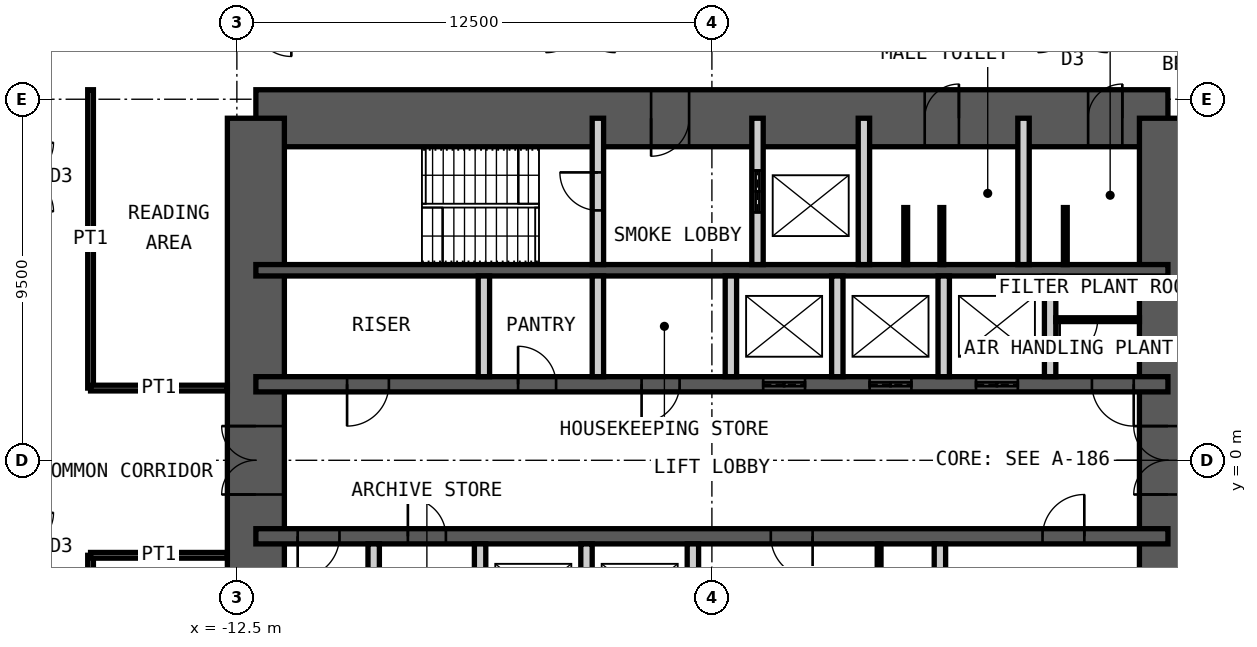
"""IFC4 building model, lengths in metres.
Left out: names, types, materials, properties, quantities, classifications, styles, units other than length and angle.
Written with IfcOpenShell. Run it as: python <this file> out.ifc"""

import sys

from ifc_helpers import new_model, si_unit, direction, frame, frame_2d, origin, place, context, subcontext, project, spatial, rectangle, extrude, element, fill, save


model = new_model("IFC4")
c1 = context("Model", 3, precision=1e-05, world=origin(), true_north=direction((0.0, 1.0)))
c2 = subcontext(c1, "Body", "Model", "MODEL_VIEW")
j1 = project(units=[si_unit("LENGTHUNIT", "METRE"), si_unit("PLANEANGLEUNIT", "RADIAN")], contexts=[c1])
p1 = place(None, origin())
s1 = spatial("IfcSite", under=j1, at=p1, CompositionType="ELEMENT")
p2 = place(p1, origin())
s2 = spatial("IfcBuilding", under=s1, at=p2, CompositionType="ELEMENT")
p3 = place(p2, frame((0.0, 0.0, 128.2)))
s3 = spatial("IfcBuildingStorey", under=s2, at=p3, CompositionType="ELEMENT", Elevation=128.2)
p4 = place(p3, frame((-12.0, 9.0, 0.0), z_axis=(0.0, 0.0, 1.0), x_axis=(1.0, 0.0, 0.0)))
e1 = element("IfcWall", 1, at=p4, inside=s3, PredefinedType="SHEAR", context=c2, shape_type="SweptSolid", body=[
    extrude(rectangle(XDim=24.0, YDim=1.5, at=frame_2d((12.0, 0.0))), origin(), (0.0, 0.0, 1.0), 4.2),
])
p5 = place(p4, frame((10.4, 0.0, 0.0)))
e2 = element("IfcOpeningElement", 2, at=p5, cuts=e1, PredefinedType="OPENING", context=c2, shape_type="SweptSolid", body=[
    extrude(rectangle(XDim=1.0, YDim=2.1, at=frame_2d((0.5, 1.05))), frame((0.0, 0.76, 0.0), z_axis=(0.0, -1.0, 0.0), x_axis=(1.0, 0.0, 0.0)), (0.0, 0.0, 1.0), 1.52),
])
p6 = place(p4, frame((17.6, 0.0, 0.0)))
e3 = element("IfcOpeningElement", 3, at=p6, cuts=e1, PredefinedType="OPENING", context=c2, shape_type="SweptSolid", body=[
    extrude(rectangle(XDim=0.9, YDim=2.1, at=frame_2d((0.45, 1.05))), frame((0.0, 0.76, 0.0), z_axis=(0.0, -1.0, 0.0), x_axis=(1.0, 0.0, 0.0)), (0.0, 0.0, 1.0), 1.52),
])
p7 = place(p4, frame((21.9, 0.0, 0.0)))
e4 = element("IfcOpeningElement", 4, at=p7, cuts=e1, PredefinedType="OPENING", context=c2, shape_type="SweptSolid", body=[
    extrude(rectangle(XDim=0.9, YDim=2.1, at=frame_2d((0.45, 1.05))), frame((0.0, 0.76, 0.0), z_axis=(0.0, -1.0, 0.0), x_axis=(1.0, 0.0, 0.0)), (0.0, 0.0, 1.0), 1.52),
])
p8 = place(p3, frame((12.0, -9.0, 0.0), z_axis=(0.0, 0.0, 1.0), x_axis=(0.0, 1.0, 0.0)))
e5 = element("IfcWall", 5, at=p8, inside=s3, PredefinedType="SHEAR", context=c2, shape_type="SweptSolid", body=[
    extrude(rectangle(XDim=18.0, YDim=1.5, at=frame_2d((9.0, 0.0))), origin(), (0.0, 0.0, 1.0), 4.2),
])
p9 = place(p8, frame((8.1, 0.0, 0.0)))
e6 = element("IfcOpeningElement", 6, at=p9, cuts=e5, PredefinedType="OPENING", context=c2, shape_type="SweptSolid", body=[
    extrude(rectangle(XDim=1.8, YDim=2.1, at=frame_2d((0.9, 1.05))), frame((0.0, 0.76, 0.0), z_axis=(0.0, -1.0, 0.0), x_axis=(1.0, 0.0, 0.0)), (0.0, 0.0, 1.0), 1.52),
])
p10 = place(p3, frame((-12.0, -9.0, 0.0), z_axis=(0.0, 0.0, 1.0), x_axis=(0.0, 1.0, 0.0)))
e7 = element("IfcWall", 7, at=p10, inside=s3, PredefinedType="SHEAR", context=c2, shape_type="SweptSolid", body=[
    extrude(rectangle(XDim=18.0, YDim=1.5, at=frame_2d((9.0, 0.0))), origin(), (0.0, 0.0, 1.0), 4.2),
])
p11 = place(p10, frame((8.1, 0.0, 0.0)))
e8 = element("IfcOpeningElement", 8, at=p11, cuts=e7, PredefinedType="OPENING", context=c2, shape_type="SweptSolid", body=[
    extrude(rectangle(XDim=1.8, YDim=2.1, at=frame_2d((0.9, 1.05))), frame((0.0, 0.76, 0.0), z_axis=(0.0, -1.0, 0.0), x_axis=(1.0, 0.0, 0.0)), (0.0, 0.0, 1.0), 1.52),
])
p12 = place(p3, frame((-12.0, 5.0, 0.0), z_axis=(0.0, 0.0, 1.0), x_axis=(1.0, 0.0, 0.0)))
e9 = element("IfcWall", 9, at=p12, inside=s3, PredefinedType="SHEAR", context=c2, shape_type="SweptSolid", body=[
    extrude(rectangle(XDim=24.0, YDim=0.3, at=frame_2d((12.0, 0.0))), origin(), (0.0, 0.0, 1.0), 4.2),
])
p13 = place(p3, frame((-12.0, 2.0, 0.0), z_axis=(0.0, 0.0, 1.0), x_axis=(1.0, 0.0, 0.0)))
e10 = element("IfcWall", 10, at=p13, inside=s3, PredefinedType="SHEAR", context=c2, shape_type="SweptSolid", body=[
    extrude(rectangle(XDim=24.0, YDim=0.4, at=frame_2d((12.0, 0.0))), origin(), (0.0, 0.0, 1.0), 4.2),
])
p14 = place(p13, frame((2.4, 0.0, 0.0)))
e11 = element("IfcOpeningElement", 11, at=p14, cuts=e10, PredefinedType="OPENING", context=c2, shape_type="SweptSolid", body=[
    extrude(rectangle(XDim=1.1, YDim=2.1, at=frame_2d((0.55, 1.05))), frame((0.0, 0.21, 0.0), z_axis=(0.0, -1.0, 0.0), x_axis=(1.0, 0.0, 0.0)), (0.0, 0.0, 1.0), 0.42),
])
p15 = place(p13, frame((22.0, 0.0, 0.0)))
e12 = element("IfcOpeningElement", 12, at=p15, cuts=e10, PredefinedType="OPENING", context=c2, shape_type="SweptSolid", body=[
    extrude(rectangle(XDim=1.1, YDim=2.1, at=frame_2d((0.55, 1.05))), frame((0.0, 0.21, 0.0), z_axis=(0.0, -1.0, 0.0), x_axis=(1.0, 0.0, 0.0)), (0.0, 0.0, 1.0), 0.42),
])
p16 = place(p13, frame((10.15, 0.0, 0.0)))
e13 = element("IfcOpeningElement", 13, at=p16, cuts=e10, PredefinedType="OPENING", context=c2, shape_type="SweptSolid", body=[
    extrude(rectangle(XDim=1.0, YDim=2.1, at=frame_2d((0.5, 1.05))), frame((0.0, 0.21, 0.0), z_axis=(0.0, -1.0, 0.0), x_axis=(1.0, 0.0, 0.0)), (0.0, 0.0, 1.0), 0.42),
])
p17 = place(p13, frame((6.9, 0.0, 0.0)))
e14 = element("IfcOpeningElement", 14, at=p17, cuts=e10, PredefinedType="OPENING", context=c2, shape_type="SweptSolid", body=[
    extrude(rectangle(XDim=1.0, YDim=2.1, at=frame_2d((0.5, 1.05))), frame((0.0, 0.21, 0.0), z_axis=(0.0, -1.0, 0.0), x_axis=(1.0, 0.0, 0.0)), (0.0, 0.0, 1.0), 0.42),
])
p18 = place(p13, frame((13.35, 0.0, 0.0)))
e15 = element("IfcOpeningElement", 15, at=p18, cuts=e10, PredefinedType="OPENING", context=c2, shape_type="SweptSolid", body=[
    extrude(rectangle(XDim=1.1, YDim=2.4, at=frame_2d((0.55, 1.2))), frame((0.0, 0.21, 0.0), z_axis=(0.0, -1.0, 0.0), x_axis=(1.0, 0.0, 0.0)), (0.0, 0.0, 1.0), 0.42),
])
p19 = place(p13, frame((16.15, 0.0, 0.0)))
e16 = element("IfcOpeningElement", 16, at=p19, cuts=e10, PredefinedType="OPENING", context=c2, shape_type="SweptSolid", body=[
    extrude(rectangle(XDim=1.1, YDim=2.4, at=frame_2d((0.55, 1.2))), frame((0.0, 0.21, 0.0), z_axis=(0.0, -1.0, 0.0), x_axis=(1.0, 0.0, 0.0)), (0.0, 0.0, 1.0), 0.42),
])
p20 = place(p13, frame((18.95, 0.0, 0.0)))
e17 = element("IfcOpeningElement", 17, at=p20, cuts=e10, PredefinedType="OPENING", context=c2, shape_type="SweptSolid", body=[
    extrude(rectangle(XDim=1.1, YDim=2.4, at=frame_2d((0.55, 1.2))), frame((0.0, 0.21, 0.0), z_axis=(0.0, -1.0, 0.0), x_axis=(1.0, 0.0, 0.0)), (0.0, 0.0, 1.0), 0.42),
])
p21 = place(p3, frame((-12.0, -2.0, 0.0), z_axis=(0.0, 0.0, 1.0), x_axis=(1.0, 0.0, 0.0)))
e18 = element("IfcWall", 18, at=p21, inside=s3, PredefinedType="SHEAR", context=c2, shape_type="SweptSolid", body=[
    extrude(rectangle(XDim=24.0, YDim=0.4, at=frame_2d((12.0, 0.0))), origin(), (0.0, 0.0, 1.0), 4.2),
])
p22 = place(p21, frame((1.1, 0.0, 0.0)))
e19 = element("IfcOpeningElement", 19, at=p22, cuts=e18, PredefinedType="OPENING", context=c2, shape_type="SweptSolid", body=[
    extrude(rectangle(XDim=1.1, YDim=2.1, at=frame_2d((0.55, 1.05))), frame((0.0, 0.21, 0.0), z_axis=(0.0, -1.0, 0.0), x_axis=(1.0, 0.0, 0.0)), (0.0, 0.0, 1.0), 0.42),
])
p23 = place(p21, frame((13.55, 0.0, 0.0)))
e20 = element("IfcOpeningElement", 20, at=p23, cuts=e18, PredefinedType="OPENING", context=c2, shape_type="SweptSolid", body=[
    extrude(rectangle(XDim=1.1, YDim=2.1, at=frame_2d((0.55, 1.05))), frame((0.0, 0.21, 0.0), z_axis=(0.0, -1.0, 0.0), x_axis=(1.0, 0.0, 0.0)), (0.0, 0.0, 1.0), 0.42),
])
p24 = place(p21, frame((20.7, 0.0, 0.0)))
e21 = element("IfcOpeningElement", 21, at=p24, cuts=e18, PredefinedType="OPENING", context=c2, shape_type="SweptSolid", body=[
    extrude(rectangle(XDim=1.1, YDim=2.1, at=frame_2d((0.55, 1.05))), frame((0.0, 0.21, 0.0), z_axis=(0.0, -1.0, 0.0), x_axis=(1.0, 0.0, 0.0)), (0.0, 0.0, 1.0), 0.42),
])
p25 = place(p21, frame((4.0, 0.0, 0.0)))
e22 = element("IfcOpeningElement", 22, at=p25, cuts=e18, PredefinedType="OPENING", context=c2, shape_type="SweptSolid", body=[
    extrude(rectangle(XDim=1.0, YDim=2.1, at=frame_2d((0.5, 1.05))), frame((0.0, 0.21, 0.0), z_axis=(0.0, -1.0, 0.0), x_axis=(1.0, 0.0, 0.0)), (0.0, 0.0, 1.0), 0.42),
])
p26 = place(p3, frame((-3.0, 5.15, 0.0), z_axis=(0.0, 0.0, 1.0), x_axis=(0.0, 1.0, 0.0)))
e23 = element("IfcWall", 23, at=p26, inside=s3, PredefinedType="PARTITIONING", context=c2, shape_type="SweptSolid", body=[
    extrude(rectangle(XDim=3.85, YDim=0.3, at=frame_2d((1.925, 0.0))), origin(), (0.0, 0.0, 1.0), 3.98),
])
p27 = place(p26, frame((1.425, 0.0, 0.0)))
e24 = element("IfcOpeningElement", 24, at=p27, cuts=e23, PredefinedType="OPENING", context=c2, shape_type="SweptSolid", body=[
    extrude(rectangle(XDim=1.0, YDim=2.1, at=frame_2d((0.5, 1.05))), frame((0.0, 0.16, 0.0), z_axis=(0.0, -1.0, 0.0), x_axis=(1.0, 0.0, 0.0)), (0.0, 0.0, 1.0), 0.32),
])
p28 = place(p3, frame((1.2, 5.15, 0.0), z_axis=(0.0, 0.0, 1.0), x_axis=(0.0, 1.0, 0.0)))
e25 = element("IfcWall", 25, at=p28, inside=s3, PredefinedType="PARTITIONING", context=c2, shape_type="SweptSolid", body=[
    extrude(rectangle(XDim=3.85, YDim=0.3, at=frame_2d((1.925, 0.0))), origin(), (0.0, 0.0, 1.0), 3.98),
])
p29 = place(p28, frame((1.375, 0.0, 0.0)))
e26 = element("IfcOpeningElement", 26, at=p29, cuts=e25, PredefinedType="OPENING", context=c2, shape_type="SweptSolid", body=[
    extrude(rectangle(XDim=1.1, YDim=2.4, at=frame_2d((0.55, 1.2))), frame((0.0, 0.16, 0.0), z_axis=(0.0, -1.0, 0.0), x_axis=(1.0, 0.0, 0.0)), (0.0, 0.0, 1.0), 0.32),
])
for number, where, z_axis, x_axis in (
    (27, (4.0, 5.15, 0.0), (0.0, 0.0, 1.0), (0.0, 1.0, 0.0)),
    (28, (8.2, 5.15, 0.0), (0.0, 0.0, 1.0), (0.0, 1.0, 0.0)),
):
    element("IfcWall", number, at=place(p3, frame(where, z_axis=z_axis, x_axis=x_axis)), inside=s3, PredefinedType="PARTITIONING", context=c2, shape_type="SweptSolid", body=[
        extrude(rectangle(XDim=3.85, YDim=0.3, at=frame_2d((1.925, 0.0))), origin(), (0.0, 0.0, 1.0), 3.98),
    ])
for number, where, z_axis, x_axis in (
    (29, (-6.0, 2.2, 0.0), (0.0, 0.0, 1.0), (0.0, 1.0, 0.0)),
    (30, (-3.0, 2.2, 0.0), (0.0, 0.0, 1.0), (0.0, 1.0, 0.0)),
    (31, (0.5, 2.2, 0.0), (0.0, 0.0, 1.0), (0.0, 1.0, 0.0)),
    (32, (3.3, 2.2, 0.0), (0.0, 0.0, 1.0), (0.0, 1.0, 0.0)),
    (33, (6.1, 2.2, 0.0), (0.0, 0.0, 1.0), (0.0, 1.0, 0.0)),
    (34, (8.9, 2.2, 0.0), (0.0, 0.0, 1.0), (0.0, 1.0, 0.0)),
    (35, (-8.9, -4.85, 0.0), (0.0, 0.0, 1.0), (0.0, 1.0, 0.0)),
    (36, (-6.1, -4.85, 0.0), (0.0, 0.0, 1.0), (0.0, 1.0, 0.0)),
    (37, (-3.3, -4.85, 0.0), (0.0, 0.0, 1.0), (0.0, 1.0, 0.0)),
    (38, (-0.5, -4.85, 0.0), (0.0, 0.0, 1.0), (0.0, 1.0, 0.0)),
    (39, (6.0, -4.85, 0.0), (0.0, 0.0, 1.0), (0.0, 1.0, 0.0)),
):
    element("IfcWall", number, at=place(p3, frame(where, z_axis=z_axis, x_axis=x_axis)), inside=s3, PredefinedType="PARTITIONING", context=c2, shape_type="SweptSolid", body=[
        extrude(rectangle(XDim=2.65, YDim=0.3, at=frame_2d((1.325, 0.0))), origin(), (0.0, 0.0, 1.0), 3.98),
    ])
p30 = place(p3, frame((4.4, -4.85, 0.0), z_axis=(0.0, 0.0, 1.0), x_axis=(0.0, 1.0, 0.0)))
e40 = element("IfcWall", 40, at=p30, inside=s3, PredefinedType="PARTITIONING", context=c2, shape_type="SweptSolid", body=[
    extrude(rectangle(XDim=2.65, YDim=0.1, at=frame_2d((1.325, 0.0))), origin(), (0.0, 0.0, 1.0), 3.98),
])
p31 = place(p30, frame((0.1, 0.0, 0.0)))
e41 = element("IfcOpeningElement", 41, at=p31, cuts=e40, PredefinedType="OPENING", context=c2, shape_type="SweptSolid", body=[
    extrude(rectangle(XDim=1.0, YDim=2.4, at=frame_2d((0.5, 1.2))), frame((0.0, 0.06, 0.0), z_axis=(0.0, -1.0, 0.0), x_axis=(1.0, 0.0, 0.0)), (0.0, 0.0, 1.0), 0.12),
])
p32 = place(p3, frame((9.05, 3.7, 0.0), z_axis=(0.0, 0.0, 1.0), x_axis=(1.0, 0.0, 0.0)))
e42 = element("IfcWall", 42, at=p32, inside=s3, PredefinedType="PARTITIONING", context=c2, shape_type="SweptSolid", body=[
    extrude(rectangle(XDim=2.2, YDim=0.1, at=frame_2d((1.1, 0.0))), origin(), (0.0, 0.0, 1.0), 3.98),
])
p33 = place(p32, frame((0.1, 0.0, 0.0)))
e43 = element("IfcOpeningElement", 43, at=p33, cuts=e42, PredefinedType="OPENING", context=c2, shape_type="SweptSolid", body=[
    extrude(rectangle(XDim=1.0, YDim=2.4, at=frame_2d((0.5, 1.2))), frame((0.0, 0.06, 0.0), z_axis=(0.0, -1.0, 0.0), x_axis=(1.0, 0.0, 0.0)), (0.0, 0.0, 1.0), 0.12),
])
for number, where, z_axis, x_axis in (
    (44, (5.1, 5.15, 0.0), (0.0, 0.0, 1.0), (0.0, 1.0, 0.0)),
    (45, (6.05, 5.15, 0.0), (0.0, 0.0, 1.0), (0.0, 1.0, 0.0)),
    (46, (9.3, 5.15, 0.0), (0.0, 0.0, 1.0), (0.0, 1.0, 0.0)),
):
    element("IfcWall", number, at=place(p3, frame(where, z_axis=z_axis, x_axis=x_axis)), inside=s3, PredefinedType="PARTITIONING", context=c2, shape_type="SweptSolid", body=[
        extrude(rectangle(XDim=1.5, YDim=0.1, at=frame_2d((0.75, 0.0))), origin(), (0.0, 0.0, 1.0), 2.1),
    ])
p34 = place(p3, frame((-16.35, 1.9, 0.0), z_axis=(0.0, 0.0, 1.0), x_axis=(0.0, 1.0, 0.0)))
e47 = element("IfcWall", 47, at=p34, inside=s3, PredefinedType="PARTITIONING", context=c2, shape_type="SweptSolid", body=[
    extrude(rectangle(XDim=7.85, YDim=0.15, at=frame_2d((3.925, 0.0))), origin(), (0.0, 0.0, 1.0), 4.03),
])
p35 = place(p3, frame((-12.75, 1.9, 0.0), z_axis=(0.0, 0.0, 1.0), x_axis=(-1.0, 0.0, 0.0)))
e48 = element("IfcWall", 48, at=p35, inside=s3, PredefinedType="PARTITIONING", context=c2, shape_type="SweptSolid", body=[
    extrude(rectangle(XDim=3.6, YDim=0.15, at=frame_2d((1.8, 0.0))), origin(), (0.0, 0.0, 1.0), 3.33),
])
p36 = place(p3, frame((-16.35, -9.75, 0.0), z_axis=(0.0, 0.0, 1.0), x_axis=(0.0, 1.0, 0.0)))
e49 = element("IfcWall", 49, at=p36, inside=s3, PredefinedType="PARTITIONING", context=c2, shape_type="SweptSolid", body=[
    extrude(rectangle(XDim=7.25, YDim=0.15, at=frame_2d((3.625, 0.0))), origin(), (0.0, 0.0, 1.0), 4.03),
])
p37 = place(p3, frame((-12.75, -2.5, 0.0), z_axis=(0.0, 0.0, 1.0), x_axis=(-1.0, 0.0, 0.0)))
e50 = element("IfcWall", 50, at=p37, inside=s3, PredefinedType="PARTITIONING", context=c2, shape_type="SweptSolid", body=[
    extrude(rectangle(XDim=3.6, YDim=0.15, at=frame_2d((1.8, 0.0))), origin(), (0.0, 0.0, 1.0), 3.33),
])
p38 = place(p5, origin())
e51 = element("IfcDoor", 51, at=p38, inside=s3, OperationType="SINGLE_SWING_LEFT", PredefinedType="DOOR", context=c2, shape_type="SweptSolid", body=[
    extrude(rectangle(XDim=1.0, YDim=2.1, at=frame_2d((0.5, 1.05))), frame((0.0, 0.025, 0.0), z_axis=(0.0, -1.0, 0.0), x_axis=(1.0, 0.0, 0.0)), (0.0, 0.0, 1.0), 0.05),
])
fill(e2, e51)
p39 = place(p6, origin())
e52 = element("IfcDoor", 52, at=p39, inside=s3, OperationType="SINGLE_SWING_LEFT", PredefinedType="DOOR", context=c2, shape_type="SweptSolid", body=[
    extrude(rectangle(XDim=0.9, YDim=2.1, at=frame_2d((0.45, 1.05))), frame((0.0, 0.025, 0.0), z_axis=(0.0, -1.0, 0.0), x_axis=(1.0, 0.0, 0.0)), (0.0, 0.0, 1.0), 0.05),
])
fill(e3, e52)
p40 = place(p7, origin())
e53 = element("IfcDoor", 53, at=p40, inside=s3, OperationType="SINGLE_SWING_LEFT", PredefinedType="DOOR", context=c2, shape_type="SweptSolid", body=[
    extrude(rectangle(XDim=0.9, YDim=2.1, at=frame_2d((0.45, 1.05))), frame((0.0, 0.025, 0.0), z_axis=(0.0, -1.0, 0.0), x_axis=(1.0, 0.0, 0.0)), (0.0, 0.0, 1.0), 0.05),
])
fill(e4, e53)
p41 = place(p27, origin())
e54 = element("IfcDoor", 54, at=p41, inside=s3, OperationType="SINGLE_SWING_LEFT", PredefinedType="DOOR", context=c2, shape_type="SweptSolid", body=[
    extrude(rectangle(XDim=1.0, YDim=2.1, at=frame_2d((0.5, 1.05))), frame((0.0, 0.025, 0.0), z_axis=(0.0, -1.0, 0.0), x_axis=(1.0, 0.0, 0.0)), (0.0, 0.0, 1.0), 0.05),
])
fill(e24, e54)
p42 = place(p14, origin())
e55 = element("IfcDoor", 55, at=p42, inside=s3, OperationType="SINGLE_SWING_LEFT", PredefinedType="DOOR", context=c2, shape_type="SweptSolid", body=[
    extrude(rectangle(XDim=1.1, YDim=2.1, at=frame_2d((0.55, 1.05))), frame((0.0, 0.025, 0.0), z_axis=(0.0, -1.0, 0.0), x_axis=(1.0, 0.0, 0.0)), (0.0, 0.0, 1.0), 0.05),
])
fill(e11, e55)
p43 = place(p22, origin())
e56 = element("IfcDoor", 56, at=p43, inside=s3, OperationType="SINGLE_SWING_LEFT", PredefinedType="DOOR", context=c2, shape_type="SweptSolid", body=[
    extrude(rectangle(XDim=1.1, YDim=2.1, at=frame_2d((0.55, 1.05))), frame((0.0, 0.025, 0.0), z_axis=(0.0, -1.0, 0.0), x_axis=(1.0, 0.0, 0.0)), (0.0, 0.0, 1.0), 0.05),
])
fill(e19, e56)
p44 = place(p15, origin())
e57 = element("IfcDoor", 57, at=p44, inside=s3, OperationType="SINGLE_SWING_RIGHT", PredefinedType="DOOR", context=c2, shape_type="SweptSolid", body=[
    extrude(rectangle(XDim=1.1, YDim=2.1, at=frame_2d((0.55, 1.05))), frame((0.0, 0.025, 0.0), z_axis=(0.0, -1.0, 0.0), x_axis=(1.0, 0.0, 0.0)), (0.0, 0.0, 1.0), 0.05),
])
fill(e12, e57)
p45 = place(p16, origin())
e58 = element("IfcDoor", 58, at=p45, inside=s3, OperationType="SINGLE_SWING_LEFT", PredefinedType="DOOR", context=c2, shape_type="SweptSolid", body=[
    extrude(rectangle(XDim=1.0, YDim=2.1, at=frame_2d((0.5, 1.05))), frame((0.0, 0.025, 0.0), z_axis=(0.0, -1.0, 0.0), x_axis=(1.0, 0.0, 0.0)), (0.0, 0.0, 1.0), 0.05),
])
fill(e13, e58)
p46 = place(p23, origin())
e59 = element("IfcDoor", 59, at=p46, inside=s3, OperationType="SINGLE_SWING_RIGHT", PredefinedType="DOOR", context=c2, shape_type="SweptSolid", body=[
    extrude(rectangle(XDim=1.1, YDim=2.1, at=frame_2d((0.55, 1.05))), frame((0.0, 0.025, 0.0), z_axis=(0.0, -1.0, 0.0), x_axis=(1.0, 0.0, 0.0)), (0.0, 0.0, 1.0), 0.05),
])
fill(e20, e59)
p47 = place(p24, origin())
e60 = element("IfcDoor", 60, at=p47, inside=s3, OperationType="SINGLE_SWING_LEFT", PredefinedType="DOOR", context=c2, shape_type="SweptSolid", body=[
    extrude(rectangle(XDim=1.1, YDim=2.1, at=frame_2d((0.55, 1.05))), frame((0.0, 0.025, 0.0), z_axis=(0.0, -1.0, 0.0), x_axis=(1.0, 0.0, 0.0)), (0.0, 0.0, 1.0), 0.05),
])
fill(e21, e60)
p48 = place(p9, origin())
e61 = element("IfcDoor", 61, at=p48, inside=s3, OperationType="DOUBLE_DOOR_DOUBLE_SWING", PredefinedType="DOOR", context=c2, shape_type="SweptSolid", body=[
    extrude(rectangle(XDim=1.8, YDim=2.1, at=frame_2d((0.9, 1.05))), frame((0.0, 0.025, 0.0), z_axis=(0.0, -1.0, 0.0), x_axis=(1.0, 0.0, 0.0)), (0.0, 0.0, 1.0), 0.05),
])
fill(e6, e61)
p49 = place(p11, origin())
e62 = element("IfcDoor", 62, at=p49, inside=s3, OperationType="DOUBLE_DOOR_DOUBLE_SWING", PredefinedType="DOOR", context=c2, shape_type="SweptSolid", body=[
    extrude(rectangle(XDim=1.8, YDim=2.1, at=frame_2d((0.9, 1.05))), frame((0.0, 0.025, 0.0), z_axis=(0.0, -1.0, 0.0), x_axis=(1.0, 0.0, 0.0)), (0.0, 0.0, 1.0), 0.05),
])
fill(e8, e62)
p50 = place(p29, origin())
e63 = element("IfcDoor", 63, at=p50, inside=s3, OperationType="DOUBLE_DOOR_SLIDING", PredefinedType="DOOR", context=c2, shape_type="SweptSolid", body=[
    extrude(rectangle(XDim=1.1, YDim=2.4, at=frame_2d((0.55, 1.2))), frame((0.0, 0.025, 0.0), z_axis=(0.0, -1.0, 0.0), x_axis=(1.0, 0.0, 0.0)), (0.0, 0.0, 1.0), 0.05),
])
fill(e26, e63)
p51 = place(p17, origin())
e64 = element("IfcDoor", 64, at=p51, inside=s3, OperationType="SINGLE_SWING_RIGHT", PredefinedType="DOOR", context=c2, shape_type="SweptSolid", body=[
    extrude(rectangle(XDim=1.0, YDim=2.1, at=frame_2d((0.5, 1.05))), frame((0.0, 0.025, 0.0), z_axis=(0.0, -1.0, 0.0), x_axis=(1.0, 0.0, 0.0)), (0.0, 0.0, 1.0), 0.05),
])
fill(e14, e64)
p52 = place(p18, origin())
e65 = element("IfcDoor", 65, at=p52, inside=s3, OperationType="DOUBLE_DOOR_SLIDING", PredefinedType="DOOR", context=c2, shape_type="SweptSolid", body=[
    extrude(rectangle(XDim=1.1, YDim=2.4, at=frame_2d((0.55, 1.2))), frame((0.0, 0.025, 0.0), z_axis=(0.0, -1.0, 0.0), x_axis=(1.0, 0.0, 0.0)), (0.0, 0.0, 1.0), 0.05),
])
fill(e15, e65)
p53 = place(p19, origin())
e66 = element("IfcDoor", 66, at=p53, inside=s3, OperationType="DOUBLE_DOOR_SLIDING", PredefinedType="DOOR", context=c2, shape_type="SweptSolid", body=[
    extrude(rectangle(XDim=1.1, YDim=2.4, at=frame_2d((0.55, 1.2))), frame((0.0, 0.025, 0.0), z_axis=(0.0, -1.0, 0.0), x_axis=(1.0, 0.0, 0.0)), (0.0, 0.0, 1.0), 0.05),
])
fill(e16, e66)
p54 = place(p20, origin())
e67 = element("IfcDoor", 67, at=p54, inside=s3, OperationType="DOUBLE_DOOR_SLIDING", PredefinedType="DOOR", context=c2, shape_type="SweptSolid", body=[
    extrude(rectangle(XDim=1.1, YDim=2.4, at=frame_2d((0.55, 1.2))), frame((0.0, 0.025, 0.0), z_axis=(0.0, -1.0, 0.0), x_axis=(1.0, 0.0, 0.0)), (0.0, 0.0, 1.0), 0.05),
])
fill(e17, e67)
p55 = place(p25, origin())
e68 = element("IfcDoor", 68, at=p55, inside=s3, OperationType="SINGLE_SWING_RIGHT", PredefinedType="DOOR", context=c2, shape_type="SweptSolid", body=[
    extrude(rectangle(XDim=1.0, YDim=2.1, at=frame_2d((0.5, 1.05))), frame((0.0, 0.025, 0.0), z_axis=(0.0, -1.0, 0.0), x_axis=(1.0, 0.0, 0.0)), (0.0, 0.0, 1.0), 0.05),
])
fill(e22, e68)
p56 = place(p33, origin())
e69 = element("IfcDoor", 69, at=p56, inside=s3, OperationType="SINGLE_SWING_LEFT", PredefinedType="DOOR", context=c2, shape_type="SweptSolid", body=[
    extrude(rectangle(XDim=1.0, YDim=2.4, at=frame_2d((0.5, 1.2))), frame((0.0, 0.025, 0.0), z_axis=(0.0, -1.0, 0.0), x_axis=(1.0, 0.0, 0.0)), (0.0, 0.0, 1.0), 0.05),
])
fill(e43, e69)
save(model, sys.argv[1])
